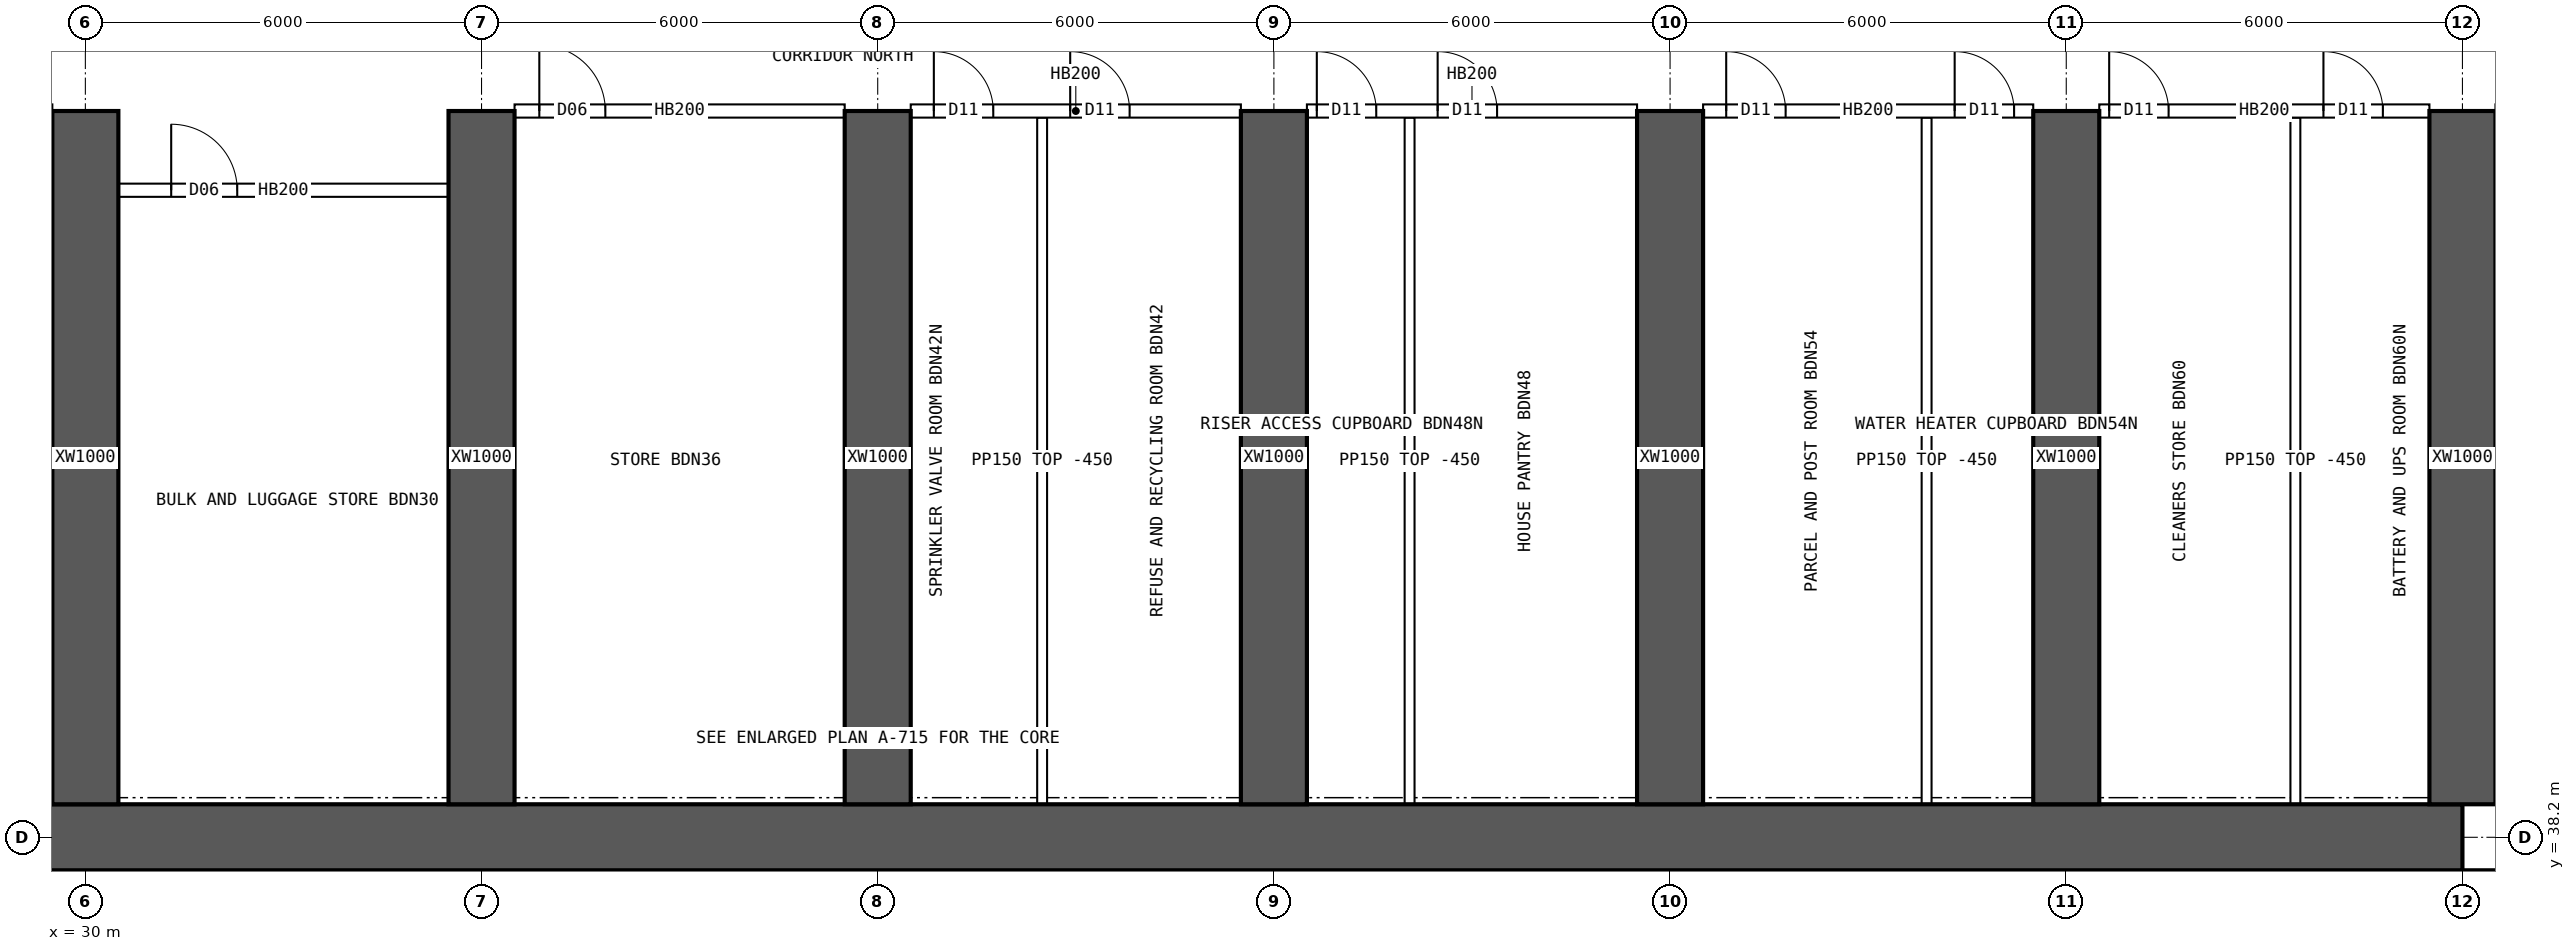
"""IFC4 building model, lengths in metres.
Left out: names, types, materials, properties, quantities, classifications, styles, units other than length and angle.
Written with IfcOpenShell. Run it as: python <this file> out.ifc"""

import sys

from ifc_helpers import new_model, si_unit, direction, frame, frame_2d, origin, place, context, subcontext, project, spatial, rectangle, extrude, element, fill, save


model = new_model("IFC4")
c1 = context("Model", 3, precision=1e-05, world=origin(), true_north=direction((0.0, 1.0)))
c2 = subcontext(c1, "Body", "Model", "MODEL_VIEW")
j1 = project(units=[si_unit("LENGTHUNIT", "METRE"), si_unit("PLANEANGLEUNIT", "RADIAN")], contexts=[c1])
p1 = place(None, origin())
s1 = spatial("IfcSite", under=j1, at=p1, CompositionType="ELEMENT")
p2 = place(p1, origin())
s2 = spatial("IfcBuilding", under=s1, at=p2, CompositionType="ELEMENT")
p3 = place(p2, frame((0.0, 0.0, 50.2)))
s3 = spatial("IfcBuildingStorey", under=s2, at=p3, CompositionType="ELEMENT", Elevation=50.2)
p4 = place(p3, frame((18.0, 38.2, 0.0), z_axis=(0.0, 0.0, 1.0), x_axis=(1.0, 0.0, 0.0)))
e1 = element("IfcWall", 1, at=p4, inside=s3, PredefinedType="SHEAR", context=c2, shape_type="SweptSolid", body=[
    extrude(rectangle(XDim=48.0, YDim=1.0, at=frame_2d((24.0, 0.0))), origin(), (0.0, 0.0, 1.0), 3.75),
])
for number, where, z_axis, x_axis in (
    (2, (62.4, 34.75, 0.0), (0.0, 0.0, 1.0), (0.0, 1.0, 0.0)),
    (3, (58.0, 34.75, 0.0), (0.0, 0.0, 1.0), (0.0, 1.0, 0.0)),
):
    element("IfcWall", number, at=place(p3, frame(where, z_axis=z_axis, x_axis=x_axis)), inside=s3, PredefinedType="SHEAR", context=c2, shape_type="SweptSolid", body=[
        extrude(rectangle(XDim=2.95, YDim=0.3, at=frame_2d((1.475, 0.0))), origin(), (0.0, 0.0, 1.0), 3.75),
    ])
for number, where, z_axis, x_axis in (
    (4, (30.0, 38.7, 0.0), (0.0, 0.0, 1.0), (0.0, 1.0, 0.0)),
    (5, (36.0, 38.7, 0.0), (0.0, 0.0, 1.0), (0.0, 1.0, 0.0)),
    (6, (42.0, 38.7, 0.0), (0.0, 0.0, 1.0), (0.0, 1.0, 0.0)),
    (7, (48.0, 38.7, 0.0), (0.0, 0.0, 1.0), (0.0, 1.0, 0.0)),
    (8, (54.0, 38.7, 0.0), (0.0, 0.0, 1.0), (0.0, 1.0, 0.0)),
    (9, (60.0, 38.7, 0.0), (0.0, 0.0, 1.0), (0.0, 1.0, 0.0)),
    (10, (66.0, 38.7, 0.0), (0.0, 0.0, 1.0), (0.0, 1.0, 0.0)),
):
    element("IfcWall", number, at=place(p3, frame(where, z_axis=z_axis, x_axis=x_axis)), inside=s3, PredefinedType="SHEAR", context=c2, shape_type="SweptSolid", body=[
        extrude(rectangle(XDim=10.5, YDim=1.0, at=frame_2d((5.25, 0.0))), origin(), (0.0, 0.0, 1.0), 3.75),
    ])
for number, where, z_axis, x_axis in (
    (11, (29.651, 34.75, 0.0), (0.0, 0.0, 1.0), (0.0, 1.0, 0.0)),
    (12, (33.946, 34.75, 0.0), (0.0, 0.0, 1.0), (0.0, 1.0, 0.0)),
    (13, (36.946, 34.75, 0.0), (0.0, 0.0, 1.0), (0.0, 1.0, 0.0)),
    (14, (41.463, 34.75, 0.0), (0.0, 0.0, 1.0), (0.0, 1.0, 0.0)),
    (15, (45.758, 34.75, 0.0), (0.0, 0.0, 1.0), (0.0, 1.0, 0.0)),
    (16, (47.058, 34.75, 0.0), (0.0, 0.0, 1.0), (0.0, 1.0, 0.0)),
    (17, (50.098, 34.75, 0.0), (0.0, 0.0, 1.0), (0.0, 1.0, 0.0)),
    (18, (54.657, 34.75, 0.0), (0.0, 0.0, 1.0), (0.0, 1.0, 0.0)),
):
    element("IfcWall", number, at=place(p3, frame(where, z_axis=z_axis, x_axis=x_axis)), inside=s3, PredefinedType="SOLIDWALL", context=c2, shape_type="SweptSolid", body=[
        extrude(rectangle(XDim=2.95, YDim=0.15, at=frame_2d((1.475, 0.0))), origin(), (0.0, 0.0, 1.0), 3.3),
    ])
p5 = place(p3, frame((36.5, 49.2, 0.0), z_axis=(0.0, 0.0, 1.0), x_axis=(1.0, 0.0, 0.0)))
e19 = element("IfcWall", 19, at=p5, inside=s3, PredefinedType="SOLIDWALL", context=c2, shape_type="SweptSolid", body=[
    extrude(rectangle(XDim=5.0, YDim=0.2, at=frame_2d((2.5, 0.0))), origin(), (0.0, 0.0, 1.0), 3.3),
])
p6 = place(p5, frame((0.375, 0.0, 0.0)))
e20 = element("IfcOpeningElement", 20, at=p6, cuts=e19, PredefinedType="OPENING", context=c2, shape_type="SweptSolid", body=[
    extrude(rectangle(XDim=1.0, YDim=2.1, at=frame_2d((0.5, 1.05))), frame((0.0, 0.11, 0.0), z_axis=(0.0, -1.0, 0.0), x_axis=(1.0, 0.0, 0.0)), (0.0, 0.0, 1.0), 0.22),
])
p7 = place(p3, frame((42.5, 49.2, 0.0), z_axis=(0.0, 0.0, 1.0), x_axis=(1.0, 0.0, 0.0)))
e21 = element("IfcWall", 21, at=p7, inside=s3, PredefinedType="SOLIDWALL", context=c2, shape_type="SweptSolid", body=[
    extrude(rectangle(XDim=5.0, YDim=0.2, at=frame_2d((2.5, 0.0))), origin(), (0.0, 0.0, 1.0), 3.3),
])
p8 = place(p7, frame((0.35, 0.0, 0.0)))
e22 = element("IfcOpeningElement", 22, at=p8, cuts=e21, PredefinedType="OPENING", context=c2, shape_type="SweptSolid", body=[
    extrude(rectangle(XDim=0.9, YDim=2.1, at=frame_2d((0.45, 1.05))), frame((0.0, 0.11, 0.0), z_axis=(0.0, -1.0, 0.0), x_axis=(1.0, 0.0, 0.0)), (0.0, 0.0, 1.0), 0.22),
])
p9 = place(p7, frame((2.415, 0.0, 0.0)))
e23 = element("IfcOpeningElement", 23, at=p9, cuts=e21, PredefinedType="OPENING", context=c2, shape_type="SweptSolid", body=[
    extrude(rectangle(XDim=0.9, YDim=2.1, at=frame_2d((0.45, 1.05))), frame((0.0, 0.11, 0.0), z_axis=(0.0, -1.0, 0.0), x_axis=(1.0, 0.0, 0.0)), (0.0, 0.0, 1.0), 0.22),
])
p10 = place(p3, frame((48.5, 49.2, 0.0), z_axis=(0.0, 0.0, 1.0), x_axis=(1.0, 0.0, 0.0)))
e24 = element("IfcWall", 24, at=p10, inside=s3, PredefinedType="SOLIDWALL", context=c2, shape_type="SweptSolid", body=[
    extrude(rectangle(XDim=5.0, YDim=0.2, at=frame_2d((2.5, 0.0))), origin(), (0.0, 0.0, 1.0), 3.3),
])
p11 = place(p10, frame((0.15, 0.0, 0.0)))
e25 = element("IfcOpeningElement", 25, at=p11, cuts=e24, PredefinedType="OPENING", context=c2, shape_type="SweptSolid", body=[
    extrude(rectangle(XDim=0.9, YDim=2.1, at=frame_2d((0.45, 1.05))), frame((0.0, 0.11, 0.0), z_axis=(0.0, -1.0, 0.0), x_axis=(1.0, 0.0, 0.0)), (0.0, 0.0, 1.0), 0.22),
])
p12 = place(p10, frame((1.98, 0.0, 0.0)))
e26 = element("IfcOpeningElement", 26, at=p12, cuts=e24, PredefinedType="OPENING", context=c2, shape_type="SweptSolid", body=[
    extrude(rectangle(XDim=0.9, YDim=2.1, at=frame_2d((0.45, 1.05))), frame((0.0, 0.11, 0.0), z_axis=(0.0, -1.0, 0.0), x_axis=(1.0, 0.0, 0.0)), (0.0, 0.0, 1.0), 0.22),
])
p13 = place(p3, frame((54.5, 49.2, 0.0), z_axis=(0.0, 0.0, 1.0), x_axis=(1.0, 0.0, 0.0)))
e27 = element("IfcWall", 27, at=p13, inside=s3, PredefinedType="SOLIDWALL", context=c2, shape_type="SweptSolid", body=[
    extrude(rectangle(XDim=5.0, YDim=0.2, at=frame_2d((2.5, 0.0))), origin(), (0.0, 0.0, 1.0), 3.3),
])
p14 = place(p13, frame((0.35, 0.0, 0.0)))
e28 = element("IfcOpeningElement", 28, at=p14, cuts=e27, PredefinedType="OPENING", context=c2, shape_type="SweptSolid", body=[
    extrude(rectangle(XDim=0.9, YDim=2.1, at=frame_2d((0.45, 1.05))), frame((0.0, 0.11, 0.0), z_axis=(0.0, -1.0, 0.0), x_axis=(1.0, 0.0, 0.0)), (0.0, 0.0, 1.0), 0.22),
])
p15 = place(p13, frame((3.81, 0.0, 0.0)))
e29 = element("IfcOpeningElement", 29, at=p15, cuts=e27, PredefinedType="OPENING", context=c2, shape_type="SweptSolid", body=[
    extrude(rectangle(XDim=0.9, YDim=2.1, at=frame_2d((0.45, 1.05))), frame((0.0, 0.11, 0.0), z_axis=(0.0, -1.0, 0.0), x_axis=(1.0, 0.0, 0.0)), (0.0, 0.0, 1.0), 0.22),
])
p16 = place(p3, frame((60.5, 49.2, 0.0), z_axis=(0.0, 0.0, 1.0), x_axis=(1.0, 0.0, 0.0)))
e30 = element("IfcWall", 30, at=p16, inside=s3, PredefinedType="SOLIDWALL", context=c2, shape_type="SweptSolid", body=[
    extrude(rectangle(XDim=5.0, YDim=0.2, at=frame_2d((2.5, 0.0))), origin(), (0.0, 0.0, 1.0), 3.3),
])
p17 = place(p16, frame((0.15, 0.0, 0.0)))
e31 = element("IfcOpeningElement", 31, at=p17, cuts=e30, PredefinedType="OPENING", context=c2, shape_type="SweptSolid", body=[
    extrude(rectangle(XDim=0.9, YDim=2.1, at=frame_2d((0.45, 1.05))), frame((0.0, 0.11, 0.0), z_axis=(0.0, -1.0, 0.0), x_axis=(1.0, 0.0, 0.0)), (0.0, 0.0, 1.0), 0.22),
])
p18 = place(p16, frame((3.395, 0.0, 0.0)))
e32 = element("IfcOpeningElement", 32, at=p18, cuts=e30, PredefinedType="OPENING", context=c2, shape_type="SweptSolid", body=[
    extrude(rectangle(XDim=0.9, YDim=2.1, at=frame_2d((0.45, 1.05))), frame((0.0, 0.11, 0.0), z_axis=(0.0, -1.0, 0.0), x_axis=(1.0, 0.0, 0.0)), (0.0, 0.0, 1.0), 0.22),
])
p19 = place(p3, frame((30.5, 48.0, 0.0), z_axis=(0.0, 0.0, 1.0), x_axis=(1.0, 0.0, 0.0)))
e33 = element("IfcWall", 33, at=p19, inside=s3, PredefinedType="SOLIDWALL", context=c2, shape_type="SweptSolid", body=[
    extrude(rectangle(XDim=5.0, YDim=0.2, at=frame_2d((2.5, 0.0))), origin(), (0.0, 0.0, 1.0), 3.3),
])
p20 = place(p19, frame((0.8, 0.0, 0.0)))
e34 = element("IfcOpeningElement", 34, at=p20, cuts=e33, PredefinedType="OPENING", context=c2, shape_type="SweptSolid", body=[
    extrude(rectangle(XDim=1.0, YDim=2.1, at=frame_2d((0.5, 1.05))), frame((0.0, 0.11, 0.0), z_axis=(0.0, -1.0, 0.0), x_axis=(1.0, 0.0, 0.0)), (0.0, 0.0, 1.0), 0.22),
])
for number, where, z_axis, x_axis in (
    (35, (44.49, 38.7, 0.0), (0.0, 0.0, 1.0), (0.0, 1.0, 0.0)),
    (36, (50.055, 38.7, 0.0), (0.0, 0.0, 1.0), (0.0, 1.0, 0.0)),
    (37, (57.885, 38.7, 0.0), (0.0, 0.0, 1.0), (0.0, 1.0, 0.0)),
    (38, (63.47, 38.7, 0.0), (0.0, 0.0, 1.0), (0.0, 1.0, 0.0)),
):
    element("IfcWall", number, at=place(p3, frame(where, z_axis=z_axis, x_axis=x_axis)), inside=s3, PredefinedType="PARTITIONING", context=c2, shape_type="SweptSolid", body=[
        extrude(rectangle(XDim=10.4, YDim=0.15, at=frame_2d((5.2, 0.0))), origin(), (0.0, 0.0, 1.0), 3.3),
    ])
p21 = place(p20, origin())
e39 = element("IfcDoor", 39, at=p21, inside=s3, OperationType="SINGLE_SWING_LEFT", PredefinedType="DOOR", context=c2, shape_type="SweptSolid", body=[
    extrude(rectangle(XDim=1.0, YDim=2.1, at=frame_2d((0.5, 1.05))), frame((0.0, 0.025, 0.0), z_axis=(0.0, -1.0, 0.0), x_axis=(1.0, 0.0, 0.0)), (0.0, 0.0, 1.0), 0.05),
])
fill(e34, e39)
p22 = place(p6, origin())
e40 = element("IfcDoor", 40, at=p22, inside=s3, OperationType="SINGLE_SWING_LEFT", PredefinedType="DOOR", context=c2, shape_type="SweptSolid", body=[
    extrude(rectangle(XDim=1.0, YDim=2.1, at=frame_2d((0.5, 1.05))), frame((0.0, 0.025, 0.0), z_axis=(0.0, -1.0, 0.0), x_axis=(1.0, 0.0, 0.0)), (0.0, 0.0, 1.0), 0.05),
])
fill(e20, e40)
p23 = place(p8, origin())
e41 = element("IfcDoor", 41, at=p23, inside=s3, OperationType="SINGLE_SWING_LEFT", PredefinedType="DOOR", context=c2, shape_type="SweptSolid", body=[
    extrude(rectangle(XDim=0.9, YDim=2.1, at=frame_2d((0.45, 1.05))), frame((0.0, 0.025, 0.0), z_axis=(0.0, -1.0, 0.0), x_axis=(1.0, 0.0, 0.0)), (0.0, 0.0, 1.0), 0.05),
])
fill(e22, e41)
p24 = place(p9, origin())
e42 = element("IfcDoor", 42, at=p24, inside=s3, OperationType="SINGLE_SWING_LEFT", PredefinedType="DOOR", context=c2, shape_type="SweptSolid", body=[
    extrude(rectangle(XDim=0.9, YDim=2.1, at=frame_2d((0.45, 1.05))), frame((0.0, 0.025, 0.0), z_axis=(0.0, -1.0, 0.0), x_axis=(1.0, 0.0, 0.0)), (0.0, 0.0, 1.0), 0.05),
])
fill(e23, e42)
p25 = place(p11, origin())
e43 = element("IfcDoor", 43, at=p25, inside=s3, OperationType="SINGLE_SWING_LEFT", PredefinedType="DOOR", context=c2, shape_type="SweptSolid", body=[
    extrude(rectangle(XDim=0.9, YDim=2.1, at=frame_2d((0.45, 1.05))), frame((0.0, 0.025, 0.0), z_axis=(0.0, -1.0, 0.0), x_axis=(1.0, 0.0, 0.0)), (0.0, 0.0, 1.0), 0.05),
])
fill(e25, e43)
p26 = place(p12, origin())
e44 = element("IfcDoor", 44, at=p26, inside=s3, OperationType="SINGLE_SWING_LEFT", PredefinedType="DOOR", context=c2, shape_type="SweptSolid", body=[
    extrude(rectangle(XDim=0.9, YDim=2.1, at=frame_2d((0.45, 1.05))), frame((0.0, 0.025, 0.0), z_axis=(0.0, -1.0, 0.0), x_axis=(1.0, 0.0, 0.0)), (0.0, 0.0, 1.0), 0.05),
])
fill(e26, e44)
p27 = place(p14, origin())
e45 = element("IfcDoor", 45, at=p27, inside=s3, OperationType="SINGLE_SWING_LEFT", PredefinedType="DOOR", context=c2, shape_type="SweptSolid", body=[
    extrude(rectangle(XDim=0.9, YDim=2.1, at=frame_2d((0.45, 1.05))), frame((0.0, 0.025, 0.0), z_axis=(0.0, -1.0, 0.0), x_axis=(1.0, 0.0, 0.0)), (0.0, 0.0, 1.0), 0.05),
])
fill(e28, e45)
p28 = place(p15, origin())
e46 = element("IfcDoor", 46, at=p28, inside=s3, OperationType="SINGLE_SWING_LEFT", PredefinedType="DOOR", context=c2, shape_type="SweptSolid", body=[
    extrude(rectangle(XDim=0.9, YDim=2.1, at=frame_2d((0.45, 1.05))), frame((0.0, 0.025, 0.0), z_axis=(0.0, -1.0, 0.0), x_axis=(1.0, 0.0, 0.0)), (0.0, 0.0, 1.0), 0.05),
])
fill(e29, e46)
p29 = place(p17, origin())
e47 = element("IfcDoor", 47, at=p29, inside=s3, OperationType="SINGLE_SWING_LEFT", PredefinedType="DOOR", context=c2, shape_type="SweptSolid", body=[
    extrude(rectangle(XDim=0.9, YDim=2.1, at=frame_2d((0.45, 1.05))), frame((0.0, 0.025, 0.0), z_axis=(0.0, -1.0, 0.0), x_axis=(1.0, 0.0, 0.0)), (0.0, 0.0, 1.0), 0.05),
])
fill(e31, e47)
p30 = place(p18, origin())
e48 = element("IfcDoor", 48, at=p30, inside=s3, OperationType="SINGLE_SWING_LEFT", PredefinedType="DOOR", context=c2, shape_type="SweptSolid", body=[
    extrude(rectangle(XDim=0.9, YDim=2.1, at=frame_2d((0.45, 1.05))), frame((0.0, 0.025, 0.0), z_axis=(0.0, -1.0, 0.0), x_axis=(1.0, 0.0, 0.0)), (0.0, 0.0, 1.0), 0.05),
])
fill(e32, e48)
save(model, sys.argv[1])
